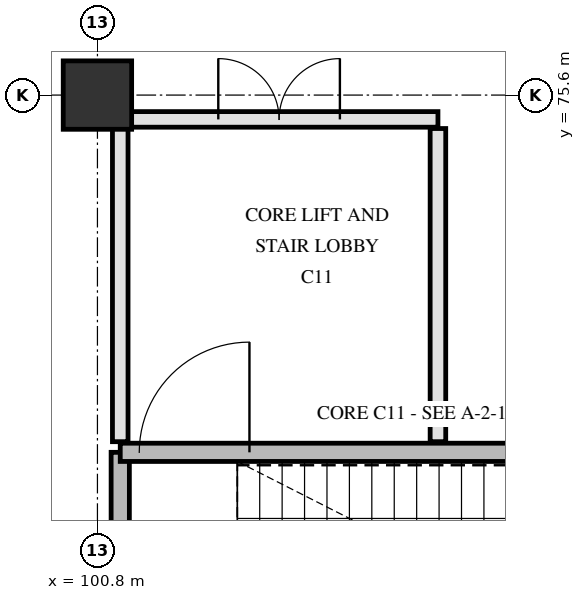
"""IFC4 building model, lengths in metres.
Left out: names, types, materials, properties, quantities, classifications, styles, units other than length and angle.
Written with IfcOpenShell. Run it as: python <this file> out.ifc"""

import sys

from ifc_helpers import new_model, si_unit, direction, frame, frame_2d, origin, origin_2d, place, context, subcontext, project, spatial, rectangle, extrude, element, fill, save


model = new_model("IFC4")
c1 = context("Model", 3, precision=1e-05, world=origin(), true_north=direction((0.0, 1.0)))
c2 = subcontext(c1, "Body", "Model", "MODEL_VIEW")
j1 = project(units=[si_unit("LENGTHUNIT", "METRE"), si_unit("PLANEANGLEUNIT", "RADIAN")], contexts=[c1])
p1 = place(None, origin())
s1 = spatial("IfcSite", under=j1, at=p1, CompositionType="ELEMENT")
p2 = place(p1, origin())
s2 = spatial("IfcBuilding", under=s1, at=p2, CompositionType="ELEMENT")
p3 = place(p2, origin())
s3 = spatial("IfcBuildingStorey", under=s2, at=p3, CompositionType="ELEMENT", Elevation=0.0)
p4 = place(p3, frame((100.8, 75.6, 0.0), z_axis=(0.0, 0.0, 1.0), x_axis=(1.0, 0.0, 0.0)))
e1 = element("IfcColumn", 1, at=p4, inside=s3, PredefinedType="COLUMN", context=c2, shape_type="SweptSolid", body=[
    extrude(rectangle(XDim=0.9, YDim=0.9, at=origin_2d()), origin(), (0.0, 0.0, 1.0), 4.8),
])
p5 = place(p3, frame((101.1, 67.58, 0.0), z_axis=(0.0, 0.0, 1.0), x_axis=(0.0, 1.0, 0.0)))
e2 = element("IfcWall", 2, at=p5, inside=s3, PredefinedType="SHEAR", context=c2, shape_type="SweptSolid", body=[
    extrude(rectangle(XDim=3.32, YDim=0.24, at=frame_2d((1.66, 0.0))), origin(), (0.0, 0.0, 1.0), 4.5),
])
p6 = place(p3, frame((101.1, 70.9, 0.0), z_axis=(0.0, 0.0, 1.0), x_axis=(1.0, 0.0, 0.0)))
e3 = element("IfcWall", 3, at=p6, inside=s3, PredefinedType="SHEAR", context=c2, shape_type="SweptSolid", body=[
    extrude(rectangle(XDim=7.82, YDim=0.24, at=frame_2d((3.91, 0.0))), origin(), (0.0, 0.0, 1.0), 4.5),
])
p7 = place(p6, frame((0.25, 0.0, 0.0)))
e4 = element("IfcOpeningElement", 4, at=p7, cuts=e3, PredefinedType="OPENING", context=c2, shape_type="SweptSolid", body=[
    extrude(rectangle(XDim=1.45, YDim=2.2, at=frame_2d((0.725, 1.1))), frame((0.0, 0.13, 0.0), z_axis=(0.0, -1.0, 0.0), x_axis=(1.0, 0.0, 0.0)), (0.0, 0.0, 1.0), 0.26),
])
p8 = place(p3, frame((105.28, 71.04, 0.0), z_axis=(0.0, 0.0, 1.0), x_axis=(0.0, 1.0, 0.0)))
e5 = element("IfcWall", 5, at=p8, inside=s3, PredefinedType="PARTITIONING", context=c2, shape_type="SweptSolid", body=[
    extrude(rectangle(XDim=4.12, YDim=0.205, at=frame_2d((2.06, 0.0))), origin(), (0.0, 0.0, 1.0), 4.49),
])
p9 = place(p3, frame((101.1, 71.04, 0.0), z_axis=(0.0, 0.0, 1.0), x_axis=(0.0, 1.0, 0.0)))
e6 = element("IfcWall", 6, at=p9, inside=s3, PredefinedType="PARTITIONING", context=c2, shape_type="SweptSolid", body=[
    extrude(rectangle(XDim=4.12, YDim=0.205, at=frame_2d((2.06, 0.0))), origin(), (0.0, 0.0, 1.0), 3.89),
])
p10 = place(p3, frame((101.1, 75.28, 0.0), z_axis=(0.0, 0.0, 1.0), x_axis=(1.0, 0.0, 0.0)))
e7 = element("IfcWall", 7, at=p10, inside=s3, PredefinedType="PARTITIONING", context=c2, shape_type="SweptSolid", body=[
    extrude(rectangle(XDim=4.18, YDim=0.205, at=frame_2d((2.09, 0.0))), origin(), (0.0, 0.0, 1.0), 3.84),
])
p11 = place(p10, frame((1.29, 0.0, 0.0)))
e8 = element("IfcOpeningElement", 8, at=p11, cuts=e7, PredefinedType="OPENING", context=c2, shape_type="SweptSolid", body=[
    extrude(rectangle(XDim=1.6, YDim=2.25, at=frame_2d((0.8, 1.125))), frame((0.0, 0.113, 0.0), z_axis=(0.0, -1.0, 0.0), x_axis=(1.0, 0.0, 0.0)), (0.0, 0.0, 1.0), 0.225),
])
p12 = place(p7, origin())
e9 = element("IfcDoor", 9, at=p12, inside=s3, OperationType="SINGLE_SWING_RIGHT", PredefinedType="DOOR", context=c2, shape_type="SweptSolid", body=[
    extrude(rectangle(XDim=1.45, YDim=2.2, at=frame_2d((0.725, 1.1))), frame((0.0, 0.025, 0.0), z_axis=(0.0, -1.0, 0.0), x_axis=(1.0, 0.0, 0.0)), (0.0, 0.0, 1.0), 0.05),
])
fill(e4, e9)
p13 = place(p11, origin())
e10 = element("IfcDoor", 10, at=p13, inside=s3, OperationType="DOUBLE_SWING_LEFT", PredefinedType="DOOR", context=c2, shape_type="SweptSolid", body=[
    extrude(rectangle(XDim=1.6, YDim=2.25, at=frame_2d((0.8, 1.125))), frame((0.0, 0.025, 0.0), z_axis=(0.0, -1.0, 0.0), x_axis=(1.0, 0.0, 0.0)), (0.0, 0.0, 1.0), 0.05),
])
fill(e8, e10)
save(model, sys.argv[1])
